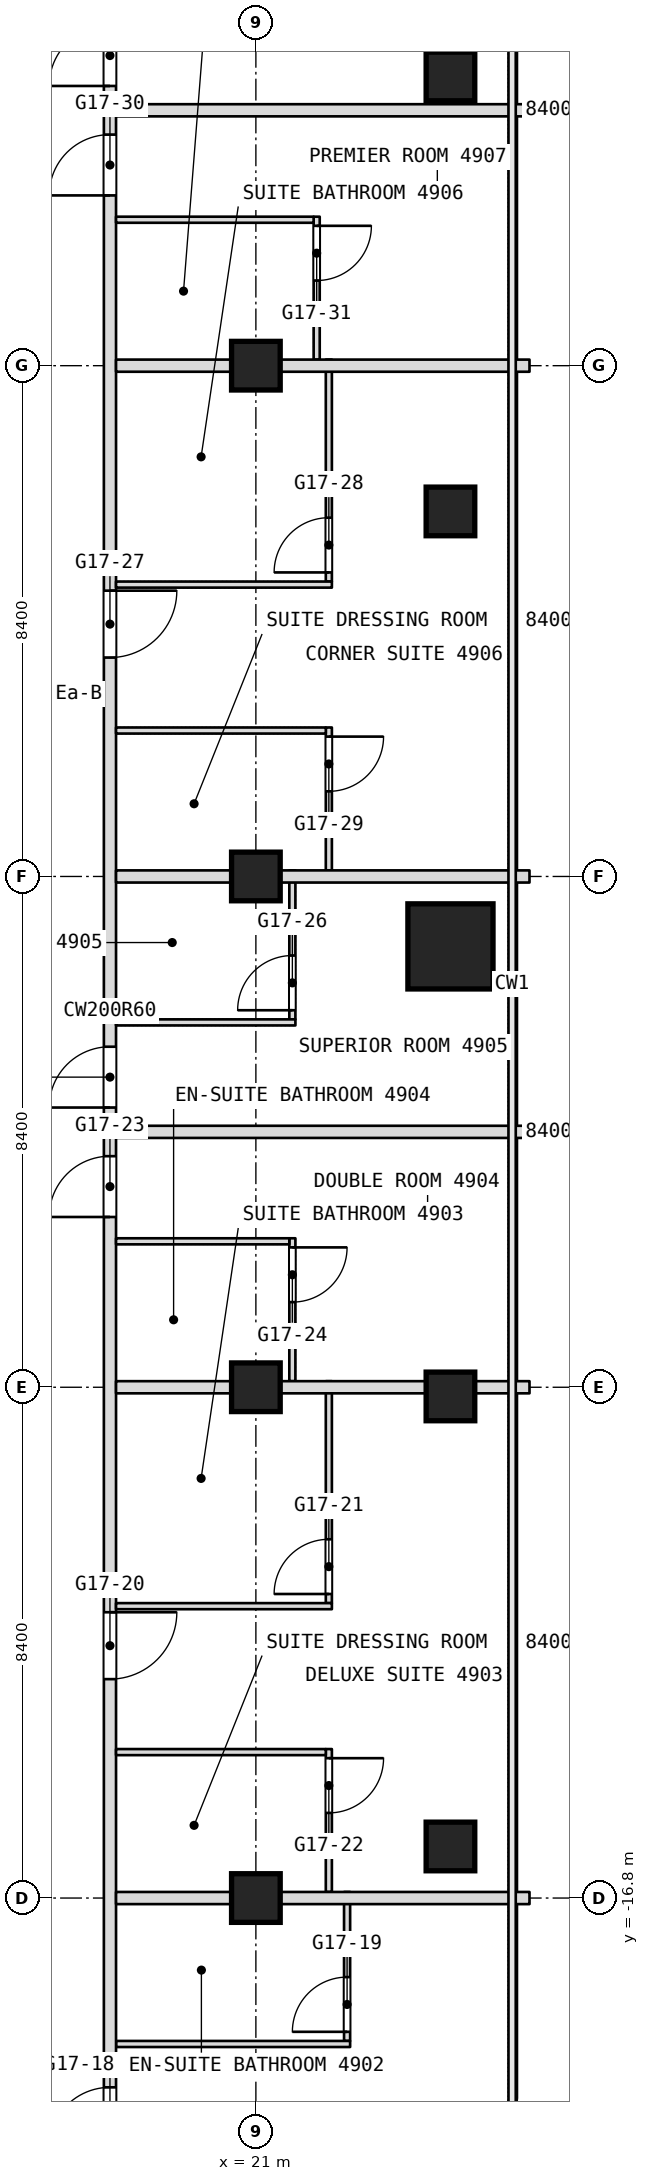
"""IFC4 building model, lengths in metres.
Left out: names, types, materials, properties, quantities, classifications, styles, units other than length and angle.
Written with IfcOpenShell. Run it as: python <this file> out.ifc"""

import sys

from ifc_helpers import new_model, si_unit, direction, frame, frame_2d, origin, origin_2d, place, context, subcontext, project, spatial, rectangle, extrude, element, fill, save


model = new_model("IFC4")
c1 = context("Model", 3, precision=1e-05, world=origin(), true_north=direction((0.0, 1.0)))
c2 = subcontext(c1, "Body", "Model", "MODEL_VIEW")
j1 = project(units=[si_unit("LENGTHUNIT", "METRE"), si_unit("PLANEANGLEUNIT", "RADIAN")], contexts=[c1])
p1 = place(None, origin())
s1 = spatial("IfcSite", under=j1, at=p1, CompositionType="ELEMENT")
p2 = place(p1, origin())
s2 = spatial("IfcBuilding", under=s1, at=p2, CompositionType="ELEMENT")
p3 = place(p2, frame((0.0, 0.0, 212.9)))
s3 = spatial("IfcBuildingStorey", under=s2, at=p3, CompositionType="ELEMENT", Elevation=212.9)
p4 = place(p3, frame((24.2, -1.15, 0.0), z_axis=(0.0, 0.0, 1.0), x_axis=(1.0, 0.0, 0.0)))
e1 = element("IfcColumn", 1, at=p4, inside=s3, PredefinedType="COLUMN", context=c2, shape_type="SweptSolid", body=[
    extrude(rectangle(XDim=1.4, YDim=1.4, at=origin_2d()), origin(), (0.0, 0.0, 1.0), 3.6),
])
for number, where, z_axis, x_axis in (
    (2, (21.0, -16.8, 0.0), (0.0, 0.0, 1.0), (1.0, 0.0, 0.0)),
    (3, (21.0, -8.4, 0.0), (0.0, 0.0, 1.0), (1.0, 0.0, 0.0)),
    (4, (21.0, 0.0, 0.0), (0.0, 0.0, 1.0), (1.0, 0.0, 0.0)),
    (5, (21.0, 8.4, 0.0), (0.0, 0.0, 1.0), (1.0, 0.0, 0.0)),
    (6, (24.2, 13.156, 0.0), (0.0, 0.0, 1.0), (1.0, 0.0, 0.0)),
    (7, (24.2, 6.003, 0.0), (0.0, 0.0, 1.0), (1.0, 0.0, 0.0)),
    (8, (24.2, -8.551, 0.0), (0.0, 0.0, 1.0), (1.0, 0.0, 0.0)),
    (9, (24.2, -15.952, 0.0), (0.0, 0.0, 1.0), (1.0, 0.0, 0.0)),
):
    element("IfcColumn", number, at=place(p3, frame(where, z_axis=z_axis, x_axis=x_axis)), inside=s3, PredefinedType="COLUMN", context=c2, shape_type="SweptSolid", body=[
        extrude(rectangle(XDim=0.8, YDim=0.8, at=origin_2d()), origin(), (0.0, 0.0, 1.0), 3.6),
    ])
p5 = place(p3, frame((22.5, -19.15, 0.0), z_axis=(0.0, 0.0, 1.0), x_axis=(0.0, 1.0, 0.0)))
e10 = element("IfcWall", 10, at=p5, inside=s3, PredefinedType="PARTITIONING", context=c2, shape_type="SweptSolid", body=[
    extrude(rectangle(XDim=2.45, YDim=0.1, at=frame_2d((1.225, 0.0))), origin(), (0.0, 0.0, 1.0), 3.34),
])
p6 = place(p5, frame((0.15, 0.0, 0.0)))
e11 = element("IfcOpeningElement", 11, at=p6, cuts=e10, PredefinedType="OPENING", context=c2, shape_type="SweptSolid", body=[
    extrude(rectangle(XDim=0.9, YDim=2.1, at=frame_2d((0.45, 1.05))), frame((0.0, 0.05, 0.0), z_axis=(0.0, -1.0, 0.0), x_axis=(1.0, 0.0, 0.0)), (0.0, 0.0, 1.0), 0.1),
])
p7 = place(p3, frame((22.2, -16.7, 0.0), z_axis=(0.0, 0.0, 1.0), x_axis=(0.0, 1.0, 0.0)))
e12 = element("IfcWall", 12, at=p7, inside=s3, PredefinedType="PARTITIONING", context=c2, shape_type="SweptSolid", body=[
    extrude(rectangle(XDim=2.35, YDim=0.1, at=frame_2d((1.175, 0.0))), origin(), (0.0, 0.0, 1.0), 3.34),
])
p8 = place(p7, frame((1.3, 0.0, 0.0)))
e13 = element("IfcOpeningElement", 13, at=p8, cuts=e12, PredefinedType="OPENING", context=c2, shape_type="SweptSolid", body=[
    extrude(rectangle(XDim=0.9, YDim=2.1, at=frame_2d((0.45, 1.05))), frame((0.0, 0.05, 0.0), z_axis=(0.0, -1.0, 0.0), x_axis=(1.0, 0.0, 0.0)), (0.0, 0.0, 1.0), 0.1),
])
p9 = place(p3, frame((22.2, -11.95, 0.0), z_axis=(0.0, 0.0, 1.0), x_axis=(0.0, 1.0, 0.0)))
e14 = element("IfcWall", 14, at=p9, inside=s3, PredefinedType="PARTITIONING", context=c2, shape_type="SweptSolid", body=[
    extrude(rectangle(XDim=3.65, YDim=0.1, at=frame_2d((1.825, 0.0))), origin(), (0.0, 0.0, 1.0), 3.34),
])
p10 = place(p9, frame((0.15, 0.0, 0.0)))
e15 = element("IfcOpeningElement", 15, at=p10, cuts=e14, PredefinedType="OPENING", context=c2, shape_type="SweptSolid", body=[
    extrude(rectangle(XDim=0.9, YDim=2.1, at=frame_2d((0.45, 1.05))), frame((0.0, 0.05, 0.0), z_axis=(0.0, -1.0, 0.0), x_axis=(1.0, 0.0, 0.0)), (0.0, 0.0, 1.0), 0.1),
])
p11 = place(p3, frame((22.2, 0.1, 0.0), z_axis=(0.0, 0.0, 1.0), x_axis=(0.0, 1.0, 0.0)))
e16 = element("IfcWall", 16, at=p11, inside=s3, PredefinedType="PARTITIONING", context=c2, shape_type="SweptSolid", body=[
    extrude(rectangle(XDim=2.35, YDim=0.1, at=frame_2d((1.175, 0.0))), origin(), (0.0, 0.0, 1.0), 3.34),
])
p12 = place(p11, frame((1.3, 0.0, 0.0)))
e17 = element("IfcOpeningElement", 17, at=p12, cuts=e16, PredefinedType="OPENING", context=c2, shape_type="SweptSolid", body=[
    extrude(rectangle(XDim=0.9, YDim=2.1, at=frame_2d((0.45, 1.05))), frame((0.0, 0.05, 0.0), z_axis=(0.0, -1.0, 0.0), x_axis=(1.0, 0.0, 0.0)), (0.0, 0.0, 1.0), 0.1),
])
p13 = place(p3, frame((22.2, 4.85, 0.0), z_axis=(0.0, 0.0, 1.0), x_axis=(0.0, 1.0, 0.0)))
e18 = element("IfcWall", 18, at=p13, inside=s3, PredefinedType="PARTITIONING", context=c2, shape_type="SweptSolid", body=[
    extrude(rectangle(XDim=3.65, YDim=0.1, at=frame_2d((1.825, 0.0))), origin(), (0.0, 0.0, 1.0), 3.34),
])
p14 = place(p13, frame((0.15, 0.0, 0.0)))
e19 = element("IfcOpeningElement", 19, at=p14, cuts=e18, PredefinedType="OPENING", context=c2, shape_type="SweptSolid", body=[
    extrude(rectangle(XDim=0.9, YDim=2.1, at=frame_2d((0.45, 1.05))), frame((0.0, 0.05, 0.0), z_axis=(0.0, -1.0, 0.0), x_axis=(1.0, 0.0, 0.0)), (0.0, 0.0, 1.0), 0.1),
])
p15 = place(p3, frame((22.0, 8.5, 0.0), z_axis=(0.0, 0.0, 1.0), x_axis=(0.0, 1.0, 0.0)))
e20 = element("IfcWall", 20, at=p15, inside=s3, PredefinedType="PARTITIONING", context=c2, shape_type="SweptSolid", body=[
    extrude(rectangle(XDim=2.35, YDim=0.1, at=frame_2d((1.175, 0.0))), origin(), (0.0, 0.0, 1.0), 3.34),
])
p16 = place(p15, frame((1.3, 0.0, 0.0)))
e21 = element("IfcOpeningElement", 21, at=p16, cuts=e20, PredefinedType="OPENING", context=c2, shape_type="SweptSolid", body=[
    extrude(rectangle(XDim=0.9, YDim=2.1, at=frame_2d((0.45, 1.05))), frame((0.0, 0.05, 0.0), z_axis=(0.0, -1.0, 0.0), x_axis=(1.0, 0.0, 0.0)), (0.0, 0.0, 1.0), 0.1),
])
p17 = place(p3, frame((21.6, -8.3, 0.0), z_axis=(0.0, 0.0, 1.0), x_axis=(0.0, 1.0, 0.0)))
e22 = element("IfcWall", 22, at=p17, inside=s3, PredefinedType="PARTITIONING", context=c2, shape_type="SweptSolid", body=[
    extrude(rectangle(XDim=2.35, YDim=0.1, at=frame_2d((1.175, 0.0))), origin(), (0.0, 0.0, 1.0), 3.34),
])
p18 = place(p17, frame((1.3, 0.0, 0.0)))
e23 = element("IfcOpeningElement", 23, at=p18, cuts=e22, PredefinedType="OPENING", context=c2, shape_type="SweptSolid", body=[
    extrude(rectangle(XDim=0.9, YDim=2.1, at=frame_2d((0.45, 1.05))), frame((0.0, 0.05, 0.0), z_axis=(0.0, -1.0, 0.0), x_axis=(1.0, 0.0, 0.0)), (0.0, 0.0, 1.0), 0.1),
])
p19 = place(p3, frame((21.6, -2.35, 0.0), z_axis=(0.0, 0.0, 1.0), x_axis=(0.0, 1.0, 0.0)))
e24 = element("IfcWall", 24, at=p19, inside=s3, PredefinedType="PARTITIONING", context=c2, shape_type="SweptSolid", body=[
    extrude(rectangle(XDim=2.45, YDim=0.1, at=frame_2d((1.225, 0.0))), origin(), (0.0, 0.0, 1.0), 3.34),
])
p20 = place(p19, frame((0.15, 0.0, 0.0)))
e25 = element("IfcOpeningElement", 25, at=p20, cuts=e24, PredefinedType="OPENING", context=c2, shape_type="SweptSolid", body=[
    extrude(rectangle(XDim=0.9, YDim=2.1, at=frame_2d((0.45, 1.05))), frame((0.0, 0.05, 0.0), z_axis=(0.0, -1.0, 0.0), x_axis=(1.0, 0.0, 0.0)), (0.0, 0.0, 1.0), 0.1),
])
p21 = place(p3, frame((18.7, -19.2, 0.0), z_axis=(0.0, 0.0, 1.0), x_axis=(1.0, 0.0, 0.0)))
e26 = element("IfcWall", 26, at=p21, inside=s3, PredefinedType="PARTITIONING", context=c2, shape_type="SweptSolid", body=[
    extrude(rectangle(XDim=3.85, YDim=0.1, at=frame_2d((1.925, 0.0))), origin(), (0.0, 0.0, 1.0), 3.34),
])
p22 = place(p3, frame((18.6, -26.751, 0.0), z_axis=(0.0, 0.0, 1.0), x_axis=(0.0, 1.0, 0.0)))
e27 = element("IfcWall", 27, at=p22, inside=s3, PredefinedType="PARTITIONING", context=c2, shape_type="SweptSolid", body=[
    extrude(rectangle(XDim=49.091, YDim=0.2, at=frame_2d((24.545, 0.0))), origin(), (0.0, 0.0, 1.0), 3.34),
])
p23 = place(p22, frame((3.413, 0.0, 0.0)))
e28 = element("IfcOpeningElement", 28, at=p23, cuts=e27, PredefinedType="OPENING", context=c2, shape_type="SweptSolid", body=[
    extrude(rectangle(XDim=1.0, YDim=2.1, at=frame_2d((0.5, 1.05))), frame((0.0, 0.1, 0.0), z_axis=(0.0, -1.0, 0.0), x_axis=(1.0, 0.0, 0.0)), (0.0, 0.0, 1.0), 0.2),
])
p24 = place(p22, frame((5.838, 0.0, 0.0)))
e29 = element("IfcOpeningElement", 29, at=p24, cuts=e27, PredefinedType="OPENING", context=c2, shape_type="SweptSolid", body=[
    extrude(rectangle(XDim=1.0, YDim=2.1, at=frame_2d((0.5, 1.05))), frame((0.0, 0.1, 0.0), z_axis=(0.0, -1.0, 0.0), x_axis=(1.0, 0.0, 0.0)), (0.0, 0.0, 1.0), 0.2),
])
p25 = place(p22, frame((13.551, 0.0, 0.0)))
e30 = element("IfcOpeningElement", 30, at=p25, cuts=e27, PredefinedType="OPENING", context=c2, shape_type="SweptSolid", body=[
    extrude(rectangle(XDim=1.1, YDim=2.1, at=frame_2d((0.55, 1.05))), frame((0.0, 0.1, 0.0), z_axis=(0.0, -1.0, 0.0), x_axis=(1.0, 0.0, 0.0)), (0.0, 0.0, 1.0), 0.2),
])
p26 = place(p22, frame((21.151, 0.0, 0.0)))
e31 = element("IfcOpeningElement", 31, at=p26, cuts=e27, PredefinedType="OPENING", context=c2, shape_type="SweptSolid", body=[
    extrude(rectangle(XDim=1.0, YDim=2.1, at=frame_2d((0.5, 1.05))), frame((0.0, 0.1, 0.0), z_axis=(0.0, -1.0, 0.0), x_axis=(1.0, 0.0, 0.0)), (0.0, 0.0, 1.0), 0.2),
])
p27 = place(p22, frame((22.951, 0.0, 0.0)))
e32 = element("IfcOpeningElement", 32, at=p27, cuts=e27, PredefinedType="OPENING", context=c2, shape_type="SweptSolid", body=[
    extrude(rectangle(XDim=1.0, YDim=2.1, at=frame_2d((0.5, 1.05))), frame((0.0, 0.1, 0.0), z_axis=(0.0, -1.0, 0.0), x_axis=(1.0, 0.0, 0.0)), (0.0, 0.0, 1.0), 0.2),
])
p28 = place(p22, frame((30.351, 0.0, 0.0)))
e33 = element("IfcOpeningElement", 33, at=p28, cuts=e27, PredefinedType="OPENING", context=c2, shape_type="SweptSolid", body=[
    extrude(rectangle(XDim=1.1, YDim=2.1, at=frame_2d((0.55, 1.05))), frame((0.0, 0.1, 0.0), z_axis=(0.0, -1.0, 0.0), x_axis=(1.0, 0.0, 0.0)), (0.0, 0.0, 1.0), 0.2),
])
p29 = place(p22, frame((37.951, 0.0, 0.0)))
e34 = element("IfcOpeningElement", 34, at=p29, cuts=e27, PredefinedType="OPENING", context=c2, shape_type="SweptSolid", body=[
    extrude(rectangle(XDim=1.0, YDim=2.1, at=frame_2d((0.5, 1.05))), frame((0.0, 0.1, 0.0), z_axis=(0.0, -1.0, 0.0), x_axis=(1.0, 0.0, 0.0)), (0.0, 0.0, 1.0), 0.2),
])
p30 = place(p22, frame((39.751, 0.0, 0.0)))
e35 = element("IfcOpeningElement", 35, at=p30, cuts=e27, PredefinedType="OPENING", context=c2, shape_type="SweptSolid", body=[
    extrude(rectangle(XDim=1.0, YDim=2.1, at=frame_2d((0.5, 1.05))), frame((0.0, 0.1, 0.0), z_axis=(0.0, -1.0, 0.0), x_axis=(1.0, 0.0, 0.0)), (0.0, 0.0, 1.0), 0.2),
])
p31 = place(p22, frame((44.051, 0.0, 0.0)))
e36 = element("IfcOpeningElement", 36, at=p31, cuts=e27, PredefinedType="OPENING", context=c2, shape_type="SweptSolid", body=[
    extrude(rectangle(XDim=1.0, YDim=2.1, at=frame_2d((0.5, 1.05))), frame((0.0, 0.1, 0.0), z_axis=(0.0, -1.0, 0.0), x_axis=(1.0, 0.0, 0.0)), (0.0, 0.0, 1.0), 0.2),
])
p32 = place(p3, frame((18.7, -16.8, 0.0), z_axis=(0.0, 0.0, 1.0), x_axis=(1.0, 0.0, 0.0)))
e37 = element("IfcWall", 37, at=p32, inside=s3, PredefinedType="PARTITIONING", context=c2, shape_type="SweptSolid", body=[
    extrude(rectangle(XDim=6.8, YDim=0.2, at=frame_2d((3.4, 0.0))), origin(), (0.0, 0.0, 1.0), 2.94),
])
p33 = place(p3, frame((18.7, -14.4, 0.0), z_axis=(0.0, 0.0, 1.0), x_axis=(1.0, 0.0, 0.0)))
e38 = element("IfcWall", 38, at=p33, inside=s3, PredefinedType="PARTITIONING", context=c2, shape_type="SweptSolid", body=[
    extrude(rectangle(XDim=3.45, YDim=0.1, at=frame_2d((1.725, 0.0))), origin(), (0.0, 0.0, 1.0), 3.34),
])
p34 = place(p3, frame((18.7, -12.0, 0.0), z_axis=(0.0, 0.0, 1.0), x_axis=(1.0, 0.0, 0.0)))
e39 = element("IfcWall", 39, at=p34, inside=s3, PredefinedType="PARTITIONING", context=c2, shape_type="SweptSolid", body=[
    extrude(rectangle(XDim=3.55, YDim=0.1, at=frame_2d((1.775, 0.0))), origin(), (0.0, 0.0, 1.0), 3.34),
])
p35 = place(p3, frame((18.7, -8.4, 0.0), z_axis=(0.0, 0.0, 1.0), x_axis=(1.0, 0.0, 0.0)))
e40 = element("IfcWall", 40, at=p35, inside=s3, PredefinedType="PARTITIONING", context=c2, shape_type="SweptSolid", body=[
    extrude(rectangle(XDim=6.8, YDim=0.2, at=frame_2d((3.4, 0.0))), origin(), (0.0, 0.0, 1.0), 2.94),
])
p36 = place(p3, frame((18.7, -6.0, 0.0), z_axis=(0.0, 0.0, 1.0), x_axis=(1.0, 0.0, 0.0)))
e41 = element("IfcWall", 41, at=p36, inside=s3, PredefinedType="PARTITIONING", context=c2, shape_type="SweptSolid", body=[
    extrude(rectangle(XDim=2.85, YDim=0.1, at=frame_2d((1.425, 0.0))), origin(), (0.0, 0.0, 1.0), 3.34),
])
p37 = place(p3, frame((18.7, -4.2, 0.0), z_axis=(0.0, 0.0, 1.0), x_axis=(1.0, 0.0, 0.0)))
e42 = element("IfcWall", 42, at=p37, inside=s3, PredefinedType="PARTITIONING", context=c2, shape_type="SweptSolid", body=[
    extrude(rectangle(XDim=6.8, YDim=0.2, at=frame_2d((3.4, 0.0))), origin(), (0.0, 0.0, 1.0), 3.34),
])
p38 = place(p3, frame((18.7, -2.4, 0.0), z_axis=(0.0, 0.0, 1.0), x_axis=(1.0, 0.0, 0.0)))
e43 = element("IfcWall", 43, at=p38, inside=s3, PredefinedType="PARTITIONING", context=c2, shape_type="SweptSolid", body=[
    extrude(rectangle(XDim=2.95, YDim=0.1, at=frame_2d((1.475, 0.0))), origin(), (0.0, 0.0, 1.0), 3.34),
])
p39 = place(p3, frame((18.7, 0.0, 0.0), z_axis=(0.0, 0.0, 1.0), x_axis=(1.0, 0.0, 0.0)))
e44 = element("IfcWall", 44, at=p39, inside=s3, PredefinedType="PARTITIONING", context=c2, shape_type="SweptSolid", body=[
    extrude(rectangle(XDim=6.8, YDim=0.2, at=frame_2d((3.4, 0.0))), origin(), (0.0, 0.0, 1.0), 2.94),
])
p40 = place(p3, frame((18.7, 2.4, 0.0), z_axis=(0.0, 0.0, 1.0), x_axis=(1.0, 0.0, 0.0)))
e45 = element("IfcWall", 45, at=p40, inside=s3, PredefinedType="PARTITIONING", context=c2, shape_type="SweptSolid", body=[
    extrude(rectangle(XDim=3.45, YDim=0.1, at=frame_2d((1.725, 0.0))), origin(), (0.0, 0.0, 1.0), 3.34),
])
p41 = place(p3, frame((18.7, 4.8, 0.0), z_axis=(0.0, 0.0, 1.0), x_axis=(1.0, 0.0, 0.0)))
e46 = element("IfcWall", 46, at=p41, inside=s3, PredefinedType="PARTITIONING", context=c2, shape_type="SweptSolid", body=[
    extrude(rectangle(XDim=3.55, YDim=0.1, at=frame_2d((1.775, 0.0))), origin(), (0.0, 0.0, 1.0), 3.34),
])
p42 = place(p3, frame((18.7, 8.4, 0.0), z_axis=(0.0, 0.0, 1.0), x_axis=(1.0, 0.0, 0.0)))
e47 = element("IfcWall", 47, at=p42, inside=s3, PredefinedType="PARTITIONING", context=c2, shape_type="SweptSolid", body=[
    extrude(rectangle(XDim=6.8, YDim=0.2, at=frame_2d((3.4, 0.0))), origin(), (0.0, 0.0, 1.0), 2.94),
])
p43 = place(p3, frame((18.7, 10.8, 0.0), z_axis=(0.0, 0.0, 1.0), x_axis=(1.0, 0.0, 0.0)))
e48 = element("IfcWall", 48, at=p43, inside=s3, PredefinedType="PARTITIONING", context=c2, shape_type="SweptSolid", body=[
    extrude(rectangle(XDim=3.25, YDim=0.1, at=frame_2d((1.625, 0.0))), origin(), (0.0, 0.0, 1.0), 3.34),
])
p44 = place(p3, frame((18.7, 12.6, 0.0), z_axis=(0.0, 0.0, 1.0), x_axis=(1.0, 0.0, 0.0)))
e49 = element("IfcWall", 49, at=p44, inside=s3, PredefinedType="PARTITIONING", context=c2, shape_type="SweptSolid", body=[
    extrude(rectangle(XDim=6.8, YDim=0.2, at=frame_2d((3.4, 0.0))), origin(), (0.0, 0.0, 1.0), 3.34),
])
p45 = place(p6, origin())
e50 = element("IfcDoor", 50, at=p45, inside=s3, OperationType="SINGLE_SWING_LEFT", PredefinedType="DOOR", context=c2, shape_type="SweptSolid", body=[
    extrude(rectangle(XDim=0.9, YDim=2.1, at=frame_2d((0.45, 1.05))), frame((0.0, 0.025, 0.0), z_axis=(0.0, -1.0, 0.0), x_axis=(1.0, 0.0, 0.0)), (0.0, 0.0, 1.0), 0.05),
])
fill(e11, e50)
p46 = place(p8, origin())
e51 = element("IfcDoor", 51, at=p46, inside=s3, OperationType="SINGLE_SWING_RIGHT", PredefinedType="DOOR", context=c2, shape_type="SweptSolid", body=[
    extrude(rectangle(XDim=0.9, YDim=2.1, at=frame_2d((0.45, 1.05))), frame((0.0, 0.025, 0.0), z_axis=(0.0, -1.0, 0.0), x_axis=(1.0, 0.0, 0.0)), (0.0, 0.0, 1.0), 0.05),
])
fill(e13, e51)
p47 = place(p10, origin())
e52 = element("IfcDoor", 52, at=p47, inside=s3, OperationType="SINGLE_SWING_LEFT", PredefinedType="DOOR", context=c2, shape_type="SweptSolid", body=[
    extrude(rectangle(XDim=0.9, YDim=2.1, at=frame_2d((0.45, 1.05))), frame((0.0, 0.025, 0.0), z_axis=(0.0, -1.0, 0.0), x_axis=(1.0, 0.0, 0.0)), (0.0, 0.0, 1.0), 0.05),
])
fill(e15, e52)
p48 = place(p12, origin())
e53 = element("IfcDoor", 53, at=p48, inside=s3, OperationType="SINGLE_SWING_RIGHT", PredefinedType="DOOR", context=c2, shape_type="SweptSolid", body=[
    extrude(rectangle(XDim=0.9, YDim=2.1, at=frame_2d((0.45, 1.05))), frame((0.0, 0.025, 0.0), z_axis=(0.0, -1.0, 0.0), x_axis=(1.0, 0.0, 0.0)), (0.0, 0.0, 1.0), 0.05),
])
fill(e17, e53)
p49 = place(p14, origin())
e54 = element("IfcDoor", 54, at=p49, inside=s3, OperationType="SINGLE_SWING_LEFT", PredefinedType="DOOR", context=c2, shape_type="SweptSolid", body=[
    extrude(rectangle(XDim=0.9, YDim=2.1, at=frame_2d((0.45, 1.05))), frame((0.0, 0.025, 0.0), z_axis=(0.0, -1.0, 0.0), x_axis=(1.0, 0.0, 0.0)), (0.0, 0.0, 1.0), 0.05),
])
fill(e19, e54)
p50 = place(p16, origin())
e55 = element("IfcDoor", 55, at=p50, inside=s3, OperationType="SINGLE_SWING_RIGHT", PredefinedType="DOOR", context=c2, shape_type="SweptSolid", body=[
    extrude(rectangle(XDim=0.9, YDim=2.1, at=frame_2d((0.45, 1.05))), frame((0.0, 0.025, 0.0), z_axis=(0.0, -1.0, 0.0), x_axis=(1.0, 0.0, 0.0)), (0.0, 0.0, 1.0), 0.05),
])
fill(e21, e55)
p51 = place(p18, origin())
e56 = element("IfcDoor", 56, at=p51, inside=s3, OperationType="SINGLE_SWING_RIGHT", PredefinedType="DOOR", context=c2, shape_type="SweptSolid", body=[
    extrude(rectangle(XDim=0.9, YDim=2.1, at=frame_2d((0.45, 1.05))), frame((0.0, 0.025, 0.0), z_axis=(0.0, -1.0, 0.0), x_axis=(1.0, 0.0, 0.0)), (0.0, 0.0, 1.0), 0.05),
])
fill(e23, e56)
p52 = place(p20, origin())
e57 = element("IfcDoor", 57, at=p52, inside=s3, OperationType="SINGLE_SWING_LEFT", PredefinedType="DOOR", context=c2, shape_type="SweptSolid", body=[
    extrude(rectangle(XDim=0.9, YDim=2.1, at=frame_2d((0.45, 1.05))), frame((0.0, 0.025, 0.0), z_axis=(0.0, -1.0, 0.0), x_axis=(1.0, 0.0, 0.0)), (0.0, 0.0, 1.0), 0.05),
])
fill(e25, e57)
p53 = place(p24, origin())
e58 = element("IfcDoor", 58, at=p53, inside=s3, OperationType="SINGLE_SWING_RIGHT", PredefinedType="DOOR", context=c2, shape_type="SweptSolid", body=[
    extrude(rectangle(XDim=1.0, YDim=2.1, at=frame_2d((0.5, 1.05))), frame((0.0, 0.025, 0.0), z_axis=(0.0, -1.0, 0.0), x_axis=(1.0, 0.0, 0.0)), (0.0, 0.0, 1.0), 0.05),
])
fill(e29, e58)
p54 = place(p25, origin())
e59 = element("IfcDoor", 59, at=p54, inside=s3, OperationType="SINGLE_SWING_LEFT", PredefinedType="DOOR", context=c2, shape_type="SweptSolid", body=[
    extrude(rectangle(XDim=1.1, YDim=2.1, at=frame_2d((0.55, 1.05))), frame((0.0, 0.025, 0.0), z_axis=(0.0, -1.0, 0.0), x_axis=(1.0, 0.0, 0.0)), (0.0, 0.0, 1.0), 0.05),
])
fill(e30, e59)
p55 = place(p26, origin())
e60 = element("IfcDoor", 60, at=p55, inside=s3, OperationType="SINGLE_SWING_LEFT", PredefinedType="DOOR", context=c2, shape_type="SweptSolid", body=[
    extrude(rectangle(XDim=1.0, YDim=2.1, at=frame_2d((0.5, 1.05))), frame((0.0, 0.025, 0.0), z_axis=(0.0, -1.0, 0.0), x_axis=(1.0, 0.0, 0.0)), (0.0, 0.0, 1.0), 0.05),
])
fill(e31, e60)
p56 = place(p27, origin())
e61 = element("IfcDoor", 61, at=p56, inside=s3, OperationType="SINGLE_SWING_LEFT", PredefinedType="DOOR", context=c2, shape_type="SweptSolid", body=[
    extrude(rectangle(XDim=1.0, YDim=2.1, at=frame_2d((0.5, 1.05))), frame((0.0, 0.025, 0.0), z_axis=(0.0, -1.0, 0.0), x_axis=(1.0, 0.0, 0.0)), (0.0, 0.0, 1.0), 0.05),
])
fill(e32, e61)
p57 = place(p28, origin())
e62 = element("IfcDoor", 62, at=p57, inside=s3, OperationType="SINGLE_SWING_LEFT", PredefinedType="DOOR", context=c2, shape_type="SweptSolid", body=[
    extrude(rectangle(XDim=1.1, YDim=2.1, at=frame_2d((0.55, 1.05))), frame((0.0, 0.025, 0.0), z_axis=(0.0, -1.0, 0.0), x_axis=(1.0, 0.0, 0.0)), (0.0, 0.0, 1.0), 0.05),
])
fill(e33, e62)
p58 = place(p29, origin())
e63 = element("IfcDoor", 63, at=p58, inside=s3, OperationType="SINGLE_SWING_RIGHT", PredefinedType="DOOR", context=c2, shape_type="SweptSolid", body=[
    extrude(rectangle(XDim=1.0, YDim=2.1, at=frame_2d((0.5, 1.05))), frame((0.0, 0.025, 0.0), z_axis=(0.0, -1.0, 0.0), x_axis=(1.0, 0.0, 0.0)), (0.0, 0.0, 1.0), 0.05),
])
fill(e34, e63)
p59 = place(p30, origin())
e64 = element("IfcDoor", 64, at=p59, inside=s3, OperationType="SINGLE_SWING_RIGHT", PredefinedType="DOOR", context=c2, shape_type="SweptSolid", body=[
    extrude(rectangle(XDim=1.0, YDim=2.1, at=frame_2d((0.5, 1.05))), frame((0.0, 0.025, 0.0), z_axis=(0.0, -1.0, 0.0), x_axis=(1.0, 0.0, 0.0)), (0.0, 0.0, 1.0), 0.05),
])
fill(e35, e64)
save(model, sys.argv[1])
